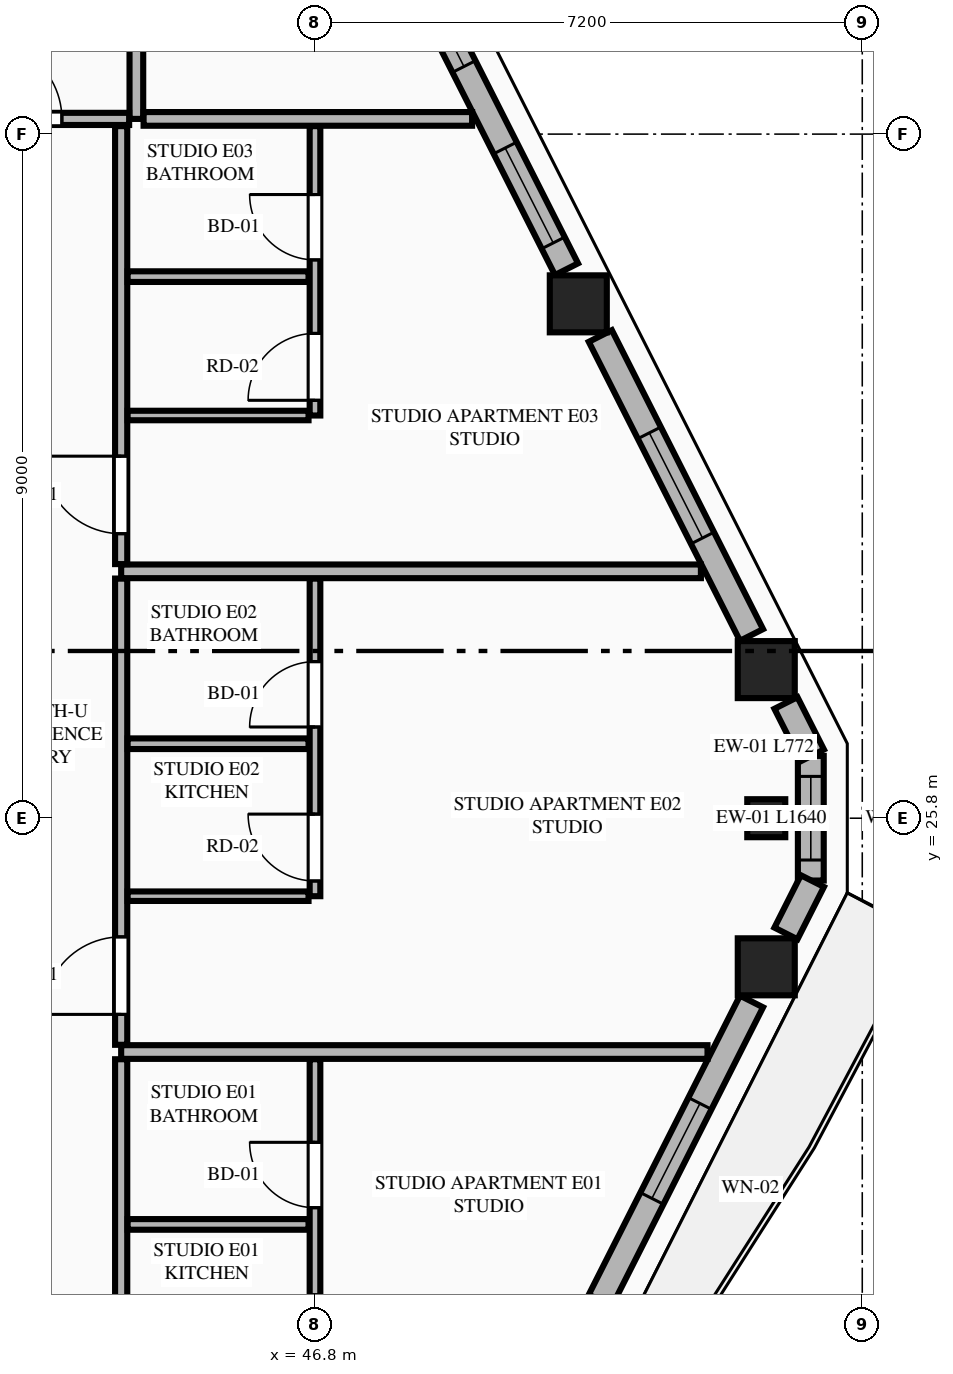
"""IFC4 building model, lengths in metres.
Left out: names, types, materials, properties, quantities, classifications, styles, units other than length and angle.
Written with IfcOpenShell. Run it as: python <this file> out.ifc"""

import sys

from ifc_helpers import new_model, si_unit, direction, frame, frame_2d, origin, origin_2d, place, context, subcontext, project, spatial, rectangle, extrude, element, fill, save


model = new_model("IFC4")
c1 = context("Model", 3, precision=1e-05, world=origin(), true_north=direction((0.0, 1.0)))
c2 = subcontext(c1, "Body", "Model", "MODEL_VIEW")
j1 = project(units=[si_unit("LENGTHUNIT", "METRE"), si_unit("PLANEANGLEUNIT", "RADIAN")], contexts=[c1])
p1 = place(None, origin())
s1 = spatial("IfcSite", under=j1, at=p1, CompositionType="ELEMENT")
p2 = place(p1, origin())
s2 = spatial("IfcBuilding", under=s1, at=p2, CompositionType="ELEMENT")
p3 = place(p2, frame((0.0, 0.0, 252.55)))
s3 = spatial("IfcBuildingStorey", under=s2, at=p3, CompositionType="ELEMENT", Elevation=252.55)
for number, where, z_axis, x_axis in (
    (1, (52.737, 23.845, 0.0), (0.0, 0.0, 1.0), (1.0, 0.0, 0.0)),
    (2, (52.737, 27.755, 0.0), (0.0, 0.0, 1.0), (1.0, 0.0, 0.0)),
    (3, (50.264, 32.567, 0.0), (0.0, 0.0, 1.0), (1.0, 0.0, 0.0)),
):
    element("IfcColumn", number, at=place(p3, frame(where, z_axis=z_axis, x_axis=x_axis)), inside=s3, PredefinedType="COLUMN", context=c2, shape_type="SweptSolid", body=[
        extrude(rectangle(XDim=0.75, YDim=0.75, at=origin_2d()), origin(), (0.0, 0.0, 1.0), 3.65),
    ])
p4 = place(p3, frame((52.737, 25.8, 0.0), z_axis=(0.0, 0.0, 1.0), x_axis=(0.0, 1.0, 0.0)))
e4 = element("IfcColumn", 4, at=p4, inside=s3, PredefinedType="PILASTER", context=c2, shape_type="SweptSolid", body=[
    extrude(rectangle(XDim=0.5, YDim=0.35, at=origin_2d()), origin(), (0.0, 0.0, 1.0), 3.65),
])
p5 = place(p3, frame((53.323, 24.98, 0.0), z_axis=(0.0, 0.0, 1.0), x_axis=(0.0, 1.0, 0.0)))
e5 = element("IfcWall", 5, at=p5, inside=s3, PredefinedType="STANDARD", context=c2, shape_type="SweptSolid", body=[
    extrude(rectangle(XDim=1.64, YDim=0.34, at=frame_2d((0.82, 0.0))), origin(), (0.0, 0.0, 1.0), 3.45),
])
p6 = place(p5, frame((0.27, 0.0, 0.75)))
e6 = element("IfcOpeningElement", 6, at=p6, cuts=e5, PredefinedType="OPENING", context=c2, shape_type="SweptSolid", body=[
    extrude(rectangle(XDim=1.1, YDim=2.0, at=frame_2d((0.55, 1.0))), frame((0.0, 0.18, 0.0), z_axis=(0.0, -1.0, 0.0), x_axis=(1.0, 0.0, 0.0)), (0.0, 0.0, 1.0), 0.36),
])
p7 = place(p3, frame((50.554, 19.456, 0.0), z_axis=(0.0, 0.0, 1.0), x_axis=(0.45130817501, 0.892368158984, 0.0)))
e7 = element("IfcWall", 7, at=p7, inside=s3, PredefinedType="STANDARD", context=c2, shape_type="SweptSolid", body=[
    extrude(rectangle(XDim=4.407, YDim=0.34, at=frame_2d((2.204, 0.0))), origin(), (0.0, 0.0, 1.0), 2.983),
])
p8 = place(p7, frame((1.504, 0.0, 0.75)))
e8 = element("IfcOpeningElement", 8, at=p8, cuts=e7, PredefinedType="OPENING", context=c2, shape_type="SweptSolid", body=[
    extrude(rectangle(XDim=1.4, YDim=2.05, at=frame_2d((0.7, 1.025))), frame((0.0, 0.18, 0.0), z_axis=(0.0, -1.0, 0.0), x_axis=(1.0, 0.0, 0.0)), (0.0, 0.0, 1.0), 0.36),
])
for number, where, z_axis, x_axis in (
    (9, (52.996, 24.284, 0.0), (0.0, 0.0, 1.0), (0.451, 0.893, 0.0)),
    (10, (53.344, 26.627, 0.0), (0.0, 0.0, 1.0), (-0.451, 0.893, 0.0)),
):
    element("IfcWall", number, at=place(p3, frame(where, z_axis=z_axis, x_axis=x_axis)), inside=s3, PredefinedType="STANDARD", context=c2, shape_type="SweptSolid", body=[
        extrude(rectangle(XDim=0.772, YDim=0.34, at=frame_2d((0.386, 0.0))), origin(), (0.0, 0.0, 1.0), 3.45),
    ])
p9 = place(p3, frame((52.543, 28.211, 0.0), z_axis=(0.0, 0.0, 1.0), x_axis=(-0.451285866323, 0.892379441077, 0.0)))
e11 = element("IfcWall", 11, at=p9, inside=s3, PredefinedType="STANDARD", context=c2, shape_type="SweptSolid", body=[
    extrude(rectangle(XDim=4.407, YDim=0.34, at=frame_2d((2.204, 0.0))), origin(), (0.0, 0.0, 1.0), 2.983),
])
p10 = place(p9, frame((1.429, 0.0, 0.75)))
e12 = element("IfcOpeningElement", 12, at=p10, cuts=e11, PredefinedType="OPENING", context=c2, shape_type="SweptSolid", body=[
    extrude(rectangle(XDim=1.55, YDim=2.05, at=frame_2d((0.775, 1.025))), frame((0.0, 0.18, 0.0), z_axis=(0.0, -1.0, 0.0), x_axis=(1.0, 0.0, 0.0)), (0.0, 0.0, 1.0), 0.36),
])
p11 = place(p3, frame((50.109, 33.023, 0.0), z_axis=(0.0, 0.0, 1.0), x_axis=(-0.451539564999, 0.892251097641, 0.0)))
e13 = element("IfcWall", 13, at=p11, inside=s3, PredefinedType="STANDARD", context=c2, shape_type="SweptSolid", body=[
    extrude(rectangle(XDim=4.6, YDim=0.34, at=frame_2d((2.3, 0.0))), origin(), (0.0, 0.0, 1.0), 2.983),
])
p12 = place(p11, frame((0.387, 0.0, 0.75)))
e14 = element("IfcOpeningElement", 14, at=p12, cuts=e13, PredefinedType="OPENING", context=c2, shape_type="SweptSolid", body=[
    extrude(rectangle(XDim=1.4, YDim=2.05, at=frame_2d((0.7, 1.025))), frame((0.0, 0.18, 0.0), z_axis=(0.0, -1.0, 0.0), x_axis=(1.0, 0.0, 0.0)), (0.0, 0.0, 1.0), 0.36),
])
p13 = place(p11, frame((2.988, 0.0, 0.75)))
e15 = element("IfcOpeningElement", 15, at=p13, cuts=e13, PredefinedType="OPENING", context=c2, shape_type="SweptSolid", body=[
    extrude(rectangle(XDim=1.1, YDim=2.0, at=frame_2d((0.55, 1.0))), frame((0.0, 0.18, 0.0), z_axis=(0.0, -1.0, 0.0), x_axis=(1.0, 0.0, 0.0)), (0.0, 0.0, 1.0), 0.36),
])
p14 = place(p3, frame((44.45, 35.0, 0.0), z_axis=(0.0, 0.0, 1.0), x_axis=(0.0, 1.0, 0.0)))
e16 = element("IfcWall", 16, at=p14, inside=s3, PredefinedType="PARTITIONING", context=c2, shape_type="SweptSolid", body=[
    extrude(rectangle(XDim=8.481, YDim=0.18, at=frame_2d((4.24, 0.0))), origin(), (0.0, 0.0, 1.0), 3.45),
])
p15 = place(p3, frame((29.241, 35.0, 0.0), z_axis=(0.0, 0.0, 1.0), x_axis=(1.0, 0.0, 0.0)))
e17 = element("IfcWall", 17, at=p15, inside=s3, PredefinedType="PARTITIONING", context=c2, shape_type="SweptSolid", body=[
    extrude(rectangle(XDim=15.114, YDim=0.16, at=frame_2d((7.557, 0.0))), origin(), (0.0, 0.0, 1.0), 3.45),
])
p16 = place(p15, frame((13.209, 0.0, 0.0)))
e18 = element("IfcOpeningElement", 18, at=p16, cuts=e17, PredefinedType="OPENING", context=c2, shape_type="SweptSolid", body=[
    extrude(rectangle(XDim=1.02, YDim=2.25, at=frame_2d((0.51, 1.125))), frame((0.0, 0.09, 0.0), z_axis=(0.0, -1.0, 0.0), x_axis=(1.0, 0.0, 0.0)), (0.0, 0.0, 1.0), 0.18),
])
p17 = place(p3, frame((44.545, 35.0, 0.0), z_axis=(0.0, 0.0, 1.0), x_axis=(1.0, 0.0, 0.0)))
e19 = element("IfcWall", 19, at=p17, inside=s3, PredefinedType="PARTITIONING", context=c2, shape_type="SweptSolid", body=[
    extrude(rectangle(XDim=4.322, YDim=0.18, at=frame_2d((2.161, 0.0))), origin(), (0.0, 0.0, 1.0), 3.45),
])
p18 = place(p3, frame((44.25, 16.495, 0.0), z_axis=(0.0, 0.0, 1.0), x_axis=(0.0, 1.0, 0.0)))
e20 = element("IfcWall", 20, at=p18, inside=s3, PredefinedType="PARTITIONING", context=c2, shape_type="SweptSolid", body=[
    extrude(rectangle(XDim=6.134, YDim=0.16, at=frame_2d((3.067, 0.0))), origin(), (0.0, 0.0, 1.0), 3.137),
])
p19 = place(p18, frame((0.4, 0.0, 0.0)))
e21 = element("IfcOpeningElement", 21, at=p19, cuts=e20, PredefinedType="OPENING", context=c2, shape_type="SweptSolid", body=[
    extrude(rectangle(XDim=1.02, YDim=2.25, at=frame_2d((0.51, 1.125))), frame((0.0, 0.09, 0.0), z_axis=(0.0, -1.0, 0.0), x_axis=(1.0, 0.0, 0.0)), (0.0, 0.0, 1.0), 0.18),
])
p20 = place(p3, frame((46.8, 18.45, 0.0), z_axis=(0.0, 0.0, 1.0), x_axis=(0.0, 1.0, 0.0)))
e22 = element("IfcWall", 22, at=p20, inside=s3, PredefinedType="PLUMBINGWALL", context=c2, shape_type="SweptSolid", body=[
    extrude(rectangle(XDim=4.179, YDim=0.14, at=frame_2d((2.089, 0.0))), origin(), (0.0, 0.0, 1.0), 3.45),
])
p21 = place(p20, frame((2.226, 0.0, 0.0)))
e23 = element("IfcOpeningElement", 23, at=p21, cuts=e22, PredefinedType="OPENING", context=c2, shape_type="SweptSolid", body=[
    extrude(rectangle(XDim=0.86, YDim=2.1, at=frame_2d((0.43, 1.05))), frame((0.0, 0.08, 0.0), z_axis=(0.0, -1.0, 0.0), x_axis=(1.0, 0.0, 0.0)), (0.0, 0.0, 1.0), 0.16),
])
p22 = place(p20, frame((0.2, 0.0, 0.0)))
e24 = element("IfcOpeningElement", 24, at=p22, cuts=e22, PredefinedType="OPENING", context=c2, shape_type="SweptSolid", body=[
    extrude(rectangle(XDim=0.88, YDim=2.15, at=frame_2d((0.44, 1.075))), frame((0.0, 0.08, 0.0), z_axis=(0.0, -1.0, 0.0), x_axis=(1.0, 0.0, 0.0)), (0.0, 0.0, 1.0), 0.16),
])
p23 = place(p3, frame((44.335, 20.456, 0.0), z_axis=(0.0, 0.0, 1.0), x_axis=(1.0, 0.0, 0.0)))
e25 = element("IfcWall", 25, at=p23, inside=s3, PredefinedType="PLUMBINGWALL", context=c2, shape_type="SweptSolid", body=[
    extrude(rectangle(XDim=2.38, YDim=0.14, at=frame_2d((1.19, 0.0))), origin(), (0.0, 0.0, 1.0), 3.45),
])
p24 = place(p3, frame((44.25, 22.724, 0.0), z_axis=(0.0, 0.0, 1.0), x_axis=(1.0, 0.0, 0.0)))
e26 = element("IfcWall", 26, at=p24, inside=s3, PredefinedType="PARTITIONING", context=c2, shape_type="SweptSolid", body=[
    extrude(rectangle(XDim=7.714, YDim=0.18, at=frame_2d((3.857, 0.0))), origin(), (0.0, 0.0, 1.0), 3.45),
])
p25 = place(p3, frame((44.25, 22.819, 0.0), z_axis=(0.0, 0.0, 1.0), x_axis=(0.0, 1.0, 0.0)))
e27 = element("IfcWall", 27, at=p25, inside=s3, PredefinedType="PARTITIONING", context=c2, shape_type="SweptSolid", body=[
    extrude(rectangle(XDim=6.134, YDim=0.16, at=frame_2d((3.067, 0.0))), origin(), (0.0, 0.0, 1.0), 3.137),
])
p26 = place(p25, frame((0.4, 0.0, 0.0)))
e28 = element("IfcOpeningElement", 28, at=p26, cuts=e27, PredefinedType="OPENING", context=c2, shape_type="SweptSolid", body=[
    extrude(rectangle(XDim=1.02, YDim=2.25, at=frame_2d((0.51, 1.125))), frame((0.0, 0.09, 0.0), z_axis=(0.0, -1.0, 0.0), x_axis=(1.0, 0.0, 0.0)), (0.0, 0.0, 1.0), 0.18),
])
p27 = place(p3, frame((44.335, 24.774, 0.0), z_axis=(0.0, 0.0, 1.0), x_axis=(1.0, 0.0, 0.0)))
e29 = element("IfcWall", 29, at=p27, inside=s3, PredefinedType="PARTITIONING", context=c2, shape_type="SweptSolid", body=[
    extrude(rectangle(XDim=2.38, YDim=0.125, at=frame_2d((1.19, 0.0))), origin(), (0.0, 0.0, 1.0), 3.45),
])
p28 = place(p3, frame((46.8, 24.774, 0.0), z_axis=(0.0, 0.0, 1.0), x_axis=(0.0, 1.0, 0.0)))
e30 = element("IfcWall", 30, at=p28, inside=s3, PredefinedType="PLUMBINGWALL", context=c2, shape_type="SweptSolid", body=[
    extrude(rectangle(XDim=4.179, YDim=0.14, at=frame_2d((2.089, 0.0))), origin(), (0.0, 0.0, 1.0), 3.45),
])
p29 = place(p28, frame((2.226, 0.0, 0.0)))
e31 = element("IfcOpeningElement", 31, at=p29, cuts=e30, PredefinedType="OPENING", context=c2, shape_type="SweptSolid", body=[
    extrude(rectangle(XDim=0.86, YDim=2.1, at=frame_2d((0.43, 1.05))), frame((0.0, 0.08, 0.0), z_axis=(0.0, -1.0, 0.0), x_axis=(1.0, 0.0, 0.0)), (0.0, 0.0, 1.0), 0.16),
])
p30 = place(p28, frame((0.2, 0.0, 0.0)))
e32 = element("IfcOpeningElement", 32, at=p30, cuts=e30, PredefinedType="OPENING", context=c2, shape_type="SweptSolid", body=[
    extrude(rectangle(XDim=0.88, YDim=2.15, at=frame_2d((0.44, 1.075))), frame((0.0, 0.08, 0.0), z_axis=(0.0, -1.0, 0.0), x_axis=(1.0, 0.0, 0.0)), (0.0, 0.0, 1.0), 0.16),
])
p31 = place(p3, frame((44.335, 26.78, 0.0), z_axis=(0.0, 0.0, 1.0), x_axis=(1.0, 0.0, 0.0)))
e33 = element("IfcWall", 33, at=p31, inside=s3, PredefinedType="PLUMBINGWALL", context=c2, shape_type="SweptSolid", body=[
    extrude(rectangle(XDim=2.38, YDim=0.14, at=frame_2d((1.19, 0.0))), origin(), (0.0, 0.0, 1.0), 3.45),
])
p32 = place(p3, frame((44.25, 29.048, 0.0), z_axis=(0.0, 0.0, 1.0), x_axis=(1.0, 0.0, 0.0)))
e34 = element("IfcWall", 34, at=p32, inside=s3, PredefinedType="PARTITIONING", context=c2, shape_type="SweptSolid", body=[
    extrude(rectangle(XDim=7.627, YDim=0.18, at=frame_2d((3.813, 0.0))), origin(), (0.0, 0.0, 1.0), 3.45),
])
p33 = place(p3, frame((44.25, 29.143, 0.0), z_axis=(0.0, 0.0, 1.0), x_axis=(0.0, 1.0, 0.0)))
e35 = element("IfcWall", 35, at=p33, inside=s3, PredefinedType="PARTITIONING", context=c2, shape_type="SweptSolid", body=[
    extrude(rectangle(XDim=5.762, YDim=0.16, at=frame_2d((2.881, 0.0))), origin(), (0.0, 0.0, 1.0), 3.137),
])
p34 = place(p33, frame((0.4, 0.0, 0.0)))
e36 = element("IfcOpeningElement", 36, at=p34, cuts=e35, PredefinedType="OPENING", context=c2, shape_type="SweptSolid", body=[
    extrude(rectangle(XDim=1.02, YDim=2.25, at=frame_2d((0.51, 1.125))), frame((0.0, 0.09, 0.0), z_axis=(0.0, -1.0, 0.0), x_axis=(1.0, 0.0, 0.0)), (0.0, 0.0, 1.0), 0.18),
])
p35 = place(p3, frame((44.335, 31.098, 0.0), z_axis=(0.0, 0.0, 1.0), x_axis=(1.0, 0.0, 0.0)))
e37 = element("IfcWall", 37, at=p35, inside=s3, PredefinedType="PARTITIONING", context=c2, shape_type="SweptSolid", body=[
    extrude(rectangle(XDim=2.38, YDim=0.125, at=frame_2d((1.19, 0.0))), origin(), (0.0, 0.0, 1.0), 3.45),
])
p36 = place(p3, frame((46.8, 31.098, 0.0), z_axis=(0.0, 0.0, 1.0), x_axis=(0.0, 1.0, 0.0)))
e38 = element("IfcWall", 38, at=p36, inside=s3, PredefinedType="PLUMBINGWALL", context=c2, shape_type="SweptSolid", body=[
    extrude(rectangle(XDim=3.807, YDim=0.14, at=frame_2d((1.904, 0.0))), origin(), (0.0, 0.0, 1.0), 3.45),
])
p37 = place(p36, frame((2.047, 0.0, 0.0)))
e39 = element("IfcOpeningElement", 39, at=p37, cuts=e38, PredefinedType="OPENING", context=c2, shape_type="SweptSolid", body=[
    extrude(rectangle(XDim=0.86, YDim=2.1, at=frame_2d((0.43, 1.05))), frame((0.0, 0.08, 0.0), z_axis=(0.0, -1.0, 0.0), x_axis=(1.0, 0.0, 0.0)), (0.0, 0.0, 1.0), 0.16),
])
p38 = place(p36, frame((0.2, 0.0, 0.0)))
e40 = element("IfcOpeningElement", 40, at=p38, cuts=e38, PredefinedType="OPENING", context=c2, shape_type="SweptSolid", body=[
    extrude(rectangle(XDim=0.88, YDim=2.15, at=frame_2d((0.44, 1.075))), frame((0.0, 0.08, 0.0), z_axis=(0.0, -1.0, 0.0), x_axis=(1.0, 0.0, 0.0)), (0.0, 0.0, 1.0), 0.16),
])
p39 = place(p3, frame((44.335, 32.925, 0.0), z_axis=(0.0, 0.0, 1.0), x_axis=(1.0, 0.0, 0.0)))
e41 = element("IfcWall", 41, at=p39, inside=s3, PredefinedType="PLUMBINGWALL", context=c2, shape_type="SweptSolid", body=[
    extrude(rectangle(XDim=2.38, YDim=0.14, at=frame_2d((1.19, 0.0))), origin(), (0.0, 0.0, 1.0), 3.45),
])
p40 = place(p8, origin())
e42 = element("IfcWindow", 42, at=p40, inside=s3, PartitioningType="SINGLE_PANEL", PredefinedType="WINDOW", context=c2, shape_type="SweptSolid", body=[
    extrude(rectangle(XDim=1.4, YDim=2.05, at=frame_2d((0.7, 1.025))), frame((0.0, 0.03, 0.0), z_axis=(0.0, -1.0, 0.0), x_axis=(1.0, 0.0, 0.0)), (0.0, 0.0, 1.0), 0.06),
])
fill(e8, e42)
p41 = place(p10, origin())
e43 = element("IfcWindow", 43, at=p41, inside=s3, PartitioningType="SINGLE_PANEL", PredefinedType="WINDOW", context=c2, shape_type="SweptSolid", body=[
    extrude(rectangle(XDim=1.55, YDim=2.05, at=frame_2d((0.775, 1.025))), frame((0.0, 0.03, 0.0), z_axis=(0.0, -1.0, 0.0), x_axis=(1.0, 0.0, 0.0)), (0.0, 0.0, 1.0), 0.06),
])
fill(e12, e43)
p42 = place(p12, origin())
e44 = element("IfcWindow", 44, at=p42, inside=s3, PartitioningType="SINGLE_PANEL", PredefinedType="WINDOW", context=c2, shape_type="SweptSolid", body=[
    extrude(rectangle(XDim=1.4, YDim=2.05, at=frame_2d((0.7, 1.025))), frame((0.0, 0.03, 0.0), z_axis=(0.0, -1.0, 0.0), x_axis=(1.0, 0.0, 0.0)), (0.0, 0.0, 1.0), 0.06),
])
fill(e14, e44)
p43 = place(p16, origin())
e45 = element("IfcDoor", 45, at=p43, inside=s3, OperationType="SINGLE_SWING_LEFT", PredefinedType="DOOR", context=c2, shape_type="SweptSolid", body=[
    extrude(rectangle(XDim=1.02, YDim=2.25, at=frame_2d((0.51, 1.125))), frame((0.0, 0.025, 0.0), z_axis=(0.0, -1.0, 0.0), x_axis=(1.0, 0.0, 0.0)), (0.0, 0.0, 1.0), 0.05),
])
fill(e18, e45)
p44 = place(p21, origin())
e46 = element("IfcDoor", 46, at=p44, inside=s3, OperationType="SINGLE_SWING_RIGHT", PredefinedType="DOOR", context=c2, shape_type="SweptSolid", body=[
    extrude(rectangle(XDim=0.86, YDim=2.1, at=frame_2d((0.43, 1.05))), frame((0.0, 0.025, 0.0), z_axis=(0.0, -1.0, 0.0), x_axis=(1.0, 0.0, 0.0)), (0.0, 0.0, 1.0), 0.05),
])
fill(e23, e46)
p45 = place(p29, origin())
e47 = element("IfcDoor", 47, at=p45, inside=s3, OperationType="SINGLE_SWING_LEFT", PredefinedType="DOOR", context=c2, shape_type="SweptSolid", body=[
    extrude(rectangle(XDim=0.86, YDim=2.1, at=frame_2d((0.43, 1.05))), frame((0.0, 0.025, 0.0), z_axis=(0.0, -1.0, 0.0), x_axis=(1.0, 0.0, 0.0)), (0.0, 0.0, 1.0), 0.05),
])
fill(e31, e47)
p46 = place(p26, origin())
e48 = element("IfcDoor", 48, at=p46, inside=s3, OperationType="SINGLE_SWING_LEFT", PredefinedType="DOOR", context=c2, shape_type="SweptSolid", body=[
    extrude(rectangle(XDim=1.02, YDim=2.25, at=frame_2d((0.51, 1.125))), frame((0.0, 0.025, 0.0), z_axis=(0.0, -1.0, 0.0), x_axis=(1.0, 0.0, 0.0)), (0.0, 0.0, 1.0), 0.05),
])
fill(e28, e48)
p47 = place(p30, origin())
e49 = element("IfcDoor", 49, at=p47, inside=s3, OperationType="SINGLE_SWING_RIGHT", PredefinedType="DOOR", context=c2, shape_type="SweptSolid", body=[
    extrude(rectangle(XDim=0.88, YDim=2.15, at=frame_2d((0.44, 1.075))), frame((0.0, 0.025, 0.0), z_axis=(0.0, -1.0, 0.0), x_axis=(1.0, 0.0, 0.0)), (0.0, 0.0, 1.0), 0.05),
])
fill(e32, e49)
p48 = place(p37, origin())
e50 = element("IfcDoor", 50, at=p48, inside=s3, OperationType="SINGLE_SWING_RIGHT", PredefinedType="DOOR", context=c2, shape_type="SweptSolid", body=[
    extrude(rectangle(XDim=0.86, YDim=2.1, at=frame_2d((0.43, 1.05))), frame((0.0, 0.025, 0.0), z_axis=(0.0, -1.0, 0.0), x_axis=(1.0, 0.0, 0.0)), (0.0, 0.0, 1.0), 0.05),
])
fill(e39, e50)
p49 = place(p34, origin())
e51 = element("IfcDoor", 51, at=p49, inside=s3, OperationType="SINGLE_SWING_RIGHT", PredefinedType="DOOR", context=c2, shape_type="SweptSolid", body=[
    extrude(rectangle(XDim=1.02, YDim=2.25, at=frame_2d((0.51, 1.125))), frame((0.0, 0.025, 0.0), z_axis=(0.0, -1.0, 0.0), x_axis=(1.0, 0.0, 0.0)), (0.0, 0.0, 1.0), 0.05),
])
fill(e36, e51)
p50 = place(p38, origin())
e52 = element("IfcDoor", 52, at=p50, inside=s3, OperationType="SINGLE_SWING_LEFT", PredefinedType="DOOR", context=c2, shape_type="SweptSolid", body=[
    extrude(rectangle(XDim=0.88, YDim=2.15, at=frame_2d((0.44, 1.075))), frame((0.0, 0.025, 0.0), z_axis=(0.0, -1.0, 0.0), x_axis=(1.0, 0.0, 0.0)), (0.0, 0.0, 1.0), 0.05),
])
fill(e40, e52)
p51 = place(p13, origin())
e53 = element("IfcWindow", 53, at=p51, inside=s3, PartitioningType="SINGLE_PANEL", PredefinedType="WINDOW", context=c2, shape_type="SweptSolid", body=[
    extrude(rectangle(XDim=1.1, YDim=2.0, at=frame_2d((0.55, 1.0))), frame((0.0, 0.03, 0.0), z_axis=(0.0, -1.0, 0.0), x_axis=(1.0, 0.0, 0.0)), (0.0, 0.0, 1.0), 0.06),
])
fill(e15, e53)
p52 = place(p6, origin())
e54 = element("IfcWindow", 54, at=p52, inside=s3, PartitioningType="SINGLE_PANEL", PredefinedType="WINDOW", context=c2, shape_type="SweptSolid", body=[
    extrude(rectangle(XDim=1.1, YDim=2.0, at=frame_2d((0.55, 1.0))), frame((0.0, 0.03, 0.0), z_axis=(0.0, -1.0, 0.0), x_axis=(1.0, 0.0, 0.0)), (0.0, 0.0, 1.0), 0.06),
])
fill(e6, e54)
save(model, sys.argv[1])
